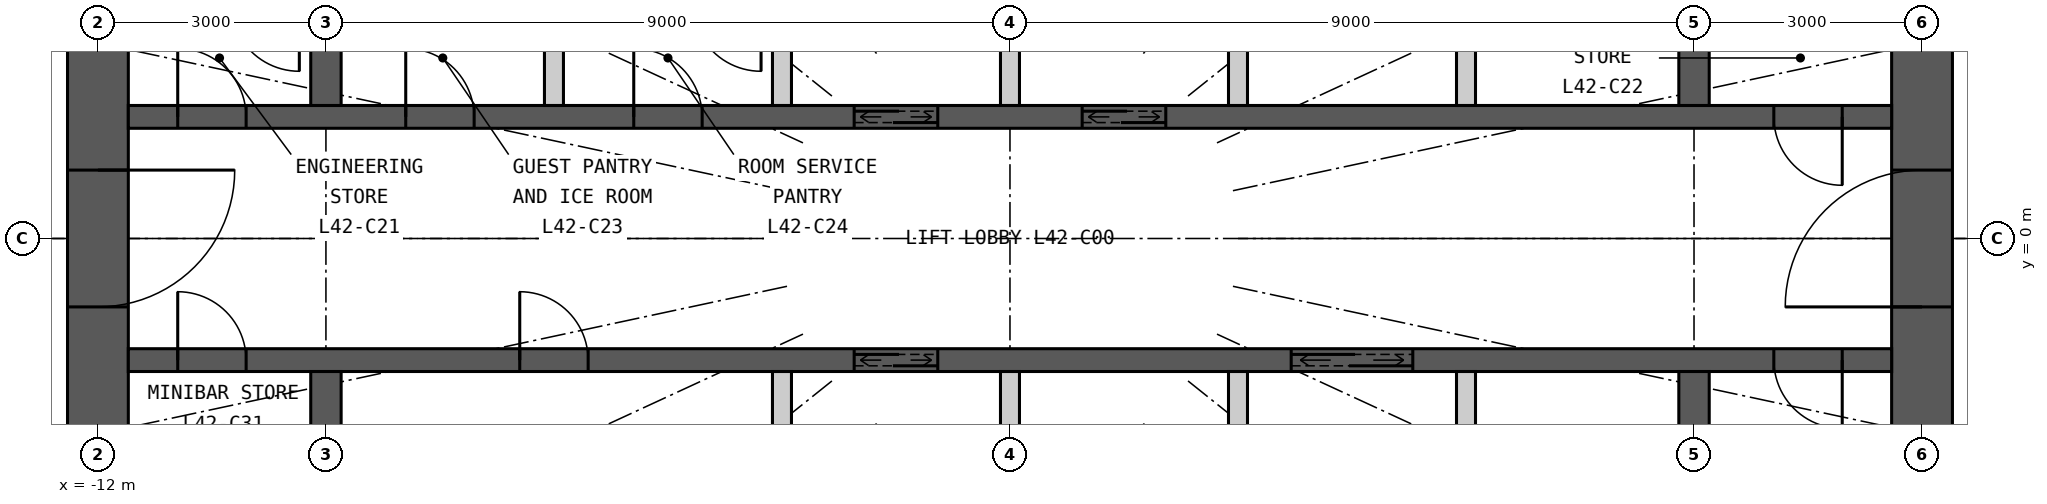
"""IFC4 building model, lengths in metres.
Left out: names, types, materials, properties, quantities, classifications, styles, units other than length and angle.
Written with IfcOpenShell. Run it as: python <this file> out.ifc"""

import sys

from ifc_helpers import new_model, si_unit, direction, frame, frame_2d, origin, place, context, subcontext, project, spatial, rectangle, extrude, element, fill, save


model = new_model("IFC4")
c1 = context("Model", 3, precision=1e-05, world=origin(), true_north=direction((0.0, 1.0)))
c2 = subcontext(c1, "Body", "Model", "MODEL_VIEW")
j1 = project(units=[si_unit("LENGTHUNIT", "METRE"), si_unit("PLANEANGLEUNIT", "RADIAN")], contexts=[c1])
p1 = place(None, origin())
s1 = spatial("IfcSite", under=j1, at=p1, CompositionType="ELEMENT")
p2 = place(p1, origin())
s2 = spatial("IfcBuilding", under=s1, at=p2, CompositionType="ELEMENT")
p3 = place(p2, frame((0.0, 0.0, 159.9)))
s3 = spatial("IfcBuildingStorey", under=s2, at=p3, CompositionType="ELEMENT", Elevation=159.9)
p4 = place(p3, frame((12.0, -7.6, 0.0), z_axis=(0.0, 0.0, 1.0), x_axis=(0.0, 1.0, 0.0)))
e1 = element("IfcWall", 1, at=p4, inside=s3, PredefinedType="SHEAR", context=c2, shape_type="SweptSolid", body=[
    extrude(rectangle(XDim=15.2, YDim=0.8, at=frame_2d((7.6, 0.0))), origin(), (0.0, 0.0, 1.0), 3.3),
])
p5 = place(p4, frame((6.7, 0.0, 0.0)))
e2 = element("IfcOpeningElement", 2, at=p5, cuts=e1, PredefinedType="OPENING", context=c2, shape_type="SweptSolid", body=[
    extrude(rectangle(XDim=1.8, YDim=2.2, at=frame_2d((0.9, 1.1))), frame((0.0, 0.41, 0.0), z_axis=(0.0, -1.0, 0.0), x_axis=(1.0, 0.0, 0.0)), (0.0, 0.0, 1.0), 0.82),
])
p6 = place(p3, frame((-12.0, 7.6, 0.0), z_axis=(0.0, 0.0, 1.0), x_axis=(0.0, -1.0, 0.0)))
e3 = element("IfcWall", 3, at=p6, inside=s3, PredefinedType="SHEAR", context=c2, shape_type="SweptSolid", body=[
    extrude(rectangle(XDim=15.2, YDim=0.8, at=frame_2d((7.6, 0.0))), origin(), (0.0, 0.0, 1.0), 3.3),
])
p7 = place(p6, frame((6.7, 0.0, 0.0)))
e4 = element("IfcOpeningElement", 4, at=p7, cuts=e3, PredefinedType="OPENING", context=c2, shape_type="SweptSolid", body=[
    extrude(rectangle(XDim=1.8, YDim=2.2, at=frame_2d((0.9, 1.1))), frame((0.0, 0.41, 0.0), z_axis=(0.0, -1.0, 0.0), x_axis=(1.0, 0.0, 0.0)), (0.0, 0.0, 1.0), 0.82),
])
p8 = place(p3, frame((-11.6, 1.6, 0.0), z_axis=(0.0, 0.0, 1.0), x_axis=(1.0, 0.0, 0.0)))
e5 = element("IfcWall", 5, at=p8, inside=s3, PredefinedType="SHEAR", context=c2, shape_type="SweptSolid", body=[
    extrude(rectangle(XDim=23.2, YDim=0.3, at=frame_2d((11.6, 0.0))), origin(), (0.0, 0.0, 1.0), 3.3),
])
p9 = place(p8, frame((9.55, 0.0, 0.0)))
e6 = element("IfcOpeningElement", 6, at=p9, cuts=e5, PredefinedType="OPENING", context=c2, shape_type="SweptSolid", body=[
    extrude(rectangle(XDim=1.1, YDim=2.2, at=frame_2d((0.55, 1.1))), frame((0.0, 0.16, 0.0), z_axis=(0.0, -1.0, 0.0), x_axis=(1.0, 0.0, 0.0)), (0.0, 0.0, 1.0), 0.32),
])
p10 = place(p8, frame((12.55, 0.0, 0.0)))
e7 = element("IfcOpeningElement", 7, at=p10, cuts=e5, PredefinedType="OPENING", context=c2, shape_type="SweptSolid", body=[
    extrude(rectangle(XDim=1.1, YDim=2.2, at=frame_2d((0.55, 1.1))), frame((0.0, 0.16, 0.0), z_axis=(0.0, -1.0, 0.0), x_axis=(1.0, 0.0, 0.0)), (0.0, 0.0, 1.0), 0.32),
])
p11 = place(p8, frame((0.65, 0.0, 0.0)))
e8 = element("IfcOpeningElement", 8, at=p11, cuts=e5, PredefinedType="OPENING", context=c2, shape_type="SweptSolid", body=[
    extrude(rectangle(XDim=0.9, YDim=2.2, at=frame_2d((0.45, 1.1))), frame((0.0, 0.16, 0.0), z_axis=(0.0, -1.0, 0.0), x_axis=(1.0, 0.0, 0.0)), (0.0, 0.0, 1.0), 0.32),
])
p12 = place(p8, frame((21.65, 0.0, 0.0)))
e9 = element("IfcOpeningElement", 9, at=p12, cuts=e5, PredefinedType="OPENING", context=c2, shape_type="SweptSolid", body=[
    extrude(rectangle(XDim=0.9, YDim=2.2, at=frame_2d((0.45, 1.1))), frame((0.0, 0.16, 0.0), z_axis=(0.0, -1.0, 0.0), x_axis=(1.0, 0.0, 0.0)), (0.0, 0.0, 1.0), 0.32),
])
p13 = place(p8, frame((3.65, 0.0, 0.0)))
e10 = element("IfcOpeningElement", 10, at=p13, cuts=e5, PredefinedType="OPENING", context=c2, shape_type="SweptSolid", body=[
    extrude(rectangle(XDim=0.9, YDim=2.2, at=frame_2d((0.45, 1.1))), frame((0.0, 0.16, 0.0), z_axis=(0.0, -1.0, 0.0), x_axis=(1.0, 0.0, 0.0)), (0.0, 0.0, 1.0), 0.32),
])
p14 = place(p8, frame((6.65, 0.0, 0.0)))
e11 = element("IfcOpeningElement", 11, at=p14, cuts=e5, PredefinedType="OPENING", context=c2, shape_type="SweptSolid", body=[
    extrude(rectangle(XDim=0.9, YDim=2.2, at=frame_2d((0.45, 1.1))), frame((0.0, 0.16, 0.0), z_axis=(0.0, -1.0, 0.0), x_axis=(1.0, 0.0, 0.0)), (0.0, 0.0, 1.0), 0.32),
])
p15 = place(p3, frame((-11.6, -1.6, 0.0), z_axis=(0.0, 0.0, 1.0), x_axis=(1.0, 0.0, 0.0)))
e12 = element("IfcWall", 12, at=p15, inside=s3, PredefinedType="SHEAR", context=c2, shape_type="SweptSolid", body=[
    extrude(rectangle(XDim=23.2, YDim=0.3, at=frame_2d((11.6, 0.0))), origin(), (0.0, 0.0, 1.0), 3.3),
])
p16 = place(p15, frame((9.55, 0.0, 0.0)))
e13 = element("IfcOpeningElement", 13, at=p16, cuts=e12, PredefinedType="OPENING", context=c2, shape_type="SweptSolid", body=[
    extrude(rectangle(XDim=1.1, YDim=2.2, at=frame_2d((0.55, 1.1))), frame((0.0, 0.16, 0.0), z_axis=(0.0, -1.0, 0.0), x_axis=(1.0, 0.0, 0.0)), (0.0, 0.0, 1.0), 0.32),
])
p17 = place(p15, frame((15.3, 0.0, 0.0)))
e14 = element("IfcOpeningElement", 14, at=p17, cuts=e12, PredefinedType="OPENING", context=c2, shape_type="SweptSolid", body=[
    extrude(rectangle(XDim=1.6, YDim=2.4, at=frame_2d((0.8, 1.2))), frame((0.0, 0.16, 0.0), z_axis=(0.0, -1.0, 0.0), x_axis=(1.0, 0.0, 0.0)), (0.0, 0.0, 1.0), 0.32),
])
p18 = place(p15, frame((0.65, 0.0, 0.0)))
e15 = element("IfcOpeningElement", 15, at=p18, cuts=e12, PredefinedType="OPENING", context=c2, shape_type="SweptSolid", body=[
    extrude(rectangle(XDim=0.9, YDim=2.2, at=frame_2d((0.45, 1.1))), frame((0.0, 0.16, 0.0), z_axis=(0.0, -1.0, 0.0), x_axis=(1.0, 0.0, 0.0)), (0.0, 0.0, 1.0), 0.32),
])
p19 = place(p15, frame((5.15, 0.0, 0.0)))
e16 = element("IfcOpeningElement", 16, at=p19, cuts=e12, PredefinedType="OPENING", context=c2, shape_type="SweptSolid", body=[
    extrude(rectangle(XDim=0.9, YDim=2.2, at=frame_2d((0.45, 1.1))), frame((0.0, 0.16, 0.0), z_axis=(0.0, -1.0, 0.0), x_axis=(1.0, 0.0, 0.0)), (0.0, 0.0, 1.0), 0.32),
])
p20 = place(p15, frame((21.65, 0.0, 0.0)))
e17 = element("IfcOpeningElement", 17, at=p20, cuts=e12, PredefinedType="OPENING", context=c2, shape_type="SweptSolid", body=[
    extrude(rectangle(XDim=0.9, YDim=2.2, at=frame_2d((0.45, 1.1))), frame((0.0, 0.16, 0.0), z_axis=(0.0, -1.0, 0.0), x_axis=(1.0, 0.0, 0.0)), (0.0, 0.0, 1.0), 0.32),
])
for number, where, z_axis, x_axis in (
    (18, (-9.0, 1.75, 0.0), (0.0, 0.0, 1.0), (0.0, 1.0, 0.0)),
    (19, (-9.0, -4.1, 0.0), (0.0, 0.0, 1.0), (0.0, 1.0, 0.0)),
    (20, (9.0, 1.75, 0.0), (0.0, 0.0, 1.0), (0.0, 1.0, 0.0)),
    (21, (9.0, -4.1, 0.0), (0.0, 0.0, 1.0), (0.0, 1.0, 0.0)),
):
    element("IfcWall", number, at=place(p3, frame(where, z_axis=z_axis, x_axis=x_axis)), inside=s3, PredefinedType="SHEAR", context=c2, shape_type="SweptSolid", body=[
        extrude(rectangle(XDim=2.35, YDim=0.4, at=frame_2d((1.175, 0.0))), origin(), (0.0, 0.0, 1.0), 3.3),
    ])
for number, where, z_axis, x_axis in (
    (22, (-6.0, 1.75, 0.0), (0.0, 0.0, 1.0), (0.0, 1.0, 0.0)),
    (23, (-3.0, 1.75, 0.0), (0.0, 0.0, 1.0), (0.0, 1.0, 0.0)),
    (24, (0.0, 1.75, 0.0), (0.0, 0.0, 1.0), (0.0, 1.0, 0.0)),
    (25, (3.0, 1.75, 0.0), (0.0, 0.0, 1.0), (0.0, 1.0, 0.0)),
    (26, (6.0, 1.75, 0.0), (0.0, 0.0, 1.0), (0.0, 1.0, 0.0)),
    (27, (-3.0, -4.1, 0.0), (0.0, 0.0, 1.0), (0.0, 1.0, 0.0)),
    (28, (0.0, -4.1, 0.0), (0.0, 0.0, 1.0), (0.0, 1.0, 0.0)),
    (29, (3.0, -4.1, 0.0), (0.0, 0.0, 1.0), (0.0, 1.0, 0.0)),
    (30, (6.0, -4.1, 0.0), (0.0, 0.0, 1.0), (0.0, 1.0, 0.0)),
):
    element("IfcWall", number, at=place(p3, frame(where, z_axis=z_axis, x_axis=x_axis)), inside=s3, PredefinedType="PARTITIONING", context=c2, shape_type="SweptSolid", body=[
        extrude(rectangle(XDim=2.35, YDim=0.25, at=frame_2d((1.175, 0.0))), origin(), (0.0, 0.0, 1.0), 3.3),
    ])
p21 = place(p9, origin())
e31 = element("IfcDoor", 31, at=p21, inside=s3, OperationType="DOUBLE_DOOR_SLIDING", PredefinedType="DOOR", context=c2, shape_type="SweptSolid", body=[
    extrude(rectangle(XDim=1.1, YDim=2.2, at=frame_2d((0.55, 1.1))), frame((0.0, 0.025, 0.0), z_axis=(0.0, -1.0, 0.0), x_axis=(1.0, 0.0, 0.0)), (0.0, 0.0, 1.0), 0.05),
])
fill(e6, e31)
p22 = place(p10, origin())
e32 = element("IfcDoor", 32, at=p22, inside=s3, OperationType="DOUBLE_DOOR_SLIDING", PredefinedType="DOOR", context=c2, shape_type="SweptSolid", body=[
    extrude(rectangle(XDim=1.1, YDim=2.2, at=frame_2d((0.55, 1.1))), frame((0.0, 0.025, 0.0), z_axis=(0.0, -1.0, 0.0), x_axis=(1.0, 0.0, 0.0)), (0.0, 0.0, 1.0), 0.05),
])
fill(e7, e32)
p23 = place(p16, origin())
e33 = element("IfcDoor", 33, at=p23, inside=s3, OperationType="DOUBLE_DOOR_SLIDING", PredefinedType="DOOR", context=c2, shape_type="SweptSolid", body=[
    extrude(rectangle(XDim=1.1, YDim=2.2, at=frame_2d((0.55, 1.1))), frame((0.0, 0.025, 0.0), z_axis=(0.0, -1.0, 0.0), x_axis=(1.0, 0.0, 0.0)), (0.0, 0.0, 1.0), 0.05),
])
fill(e13, e33)
p24 = place(p17, origin())
e34 = element("IfcDoor", 34, at=p24, inside=s3, OperationType="DOUBLE_DOOR_SLIDING", PredefinedType="DOOR", context=c2, shape_type="SweptSolid", body=[
    extrude(rectangle(XDim=1.6, YDim=2.4, at=frame_2d((0.8, 1.2))), frame((0.0, 0.025, 0.0), z_axis=(0.0, -1.0, 0.0), x_axis=(1.0, 0.0, 0.0)), (0.0, 0.0, 1.0), 0.05),
])
fill(e14, e34)
p25 = place(p11, origin())
e35 = element("IfcDoor", 35, at=p25, inside=s3, OperationType="SINGLE_SWING_LEFT", PredefinedType="DOOR", context=c2, shape_type="SweptSolid", body=[
    extrude(rectangle(XDim=0.9, YDim=2.2, at=frame_2d((0.45, 1.1))), frame((0.0, 0.025, 0.0), z_axis=(0.0, -1.0, 0.0), x_axis=(1.0, 0.0, 0.0)), (0.0, 0.0, 1.0), 0.05),
])
fill(e8, e35)
p26 = place(p12, origin())
e36 = element("IfcDoor", 36, at=p26, inside=s3, OperationType="SINGLE_SWING_RIGHT", PredefinedType="DOOR", context=c2, shape_type="SweptSolid", body=[
    extrude(rectangle(XDim=0.9, YDim=2.2, at=frame_2d((0.45, 1.1))), frame((0.0, 0.025, 0.0), z_axis=(0.0, -1.0, 0.0), x_axis=(1.0, 0.0, 0.0)), (0.0, 0.0, 1.0), 0.05),
])
fill(e9, e36)
p27 = place(p18, origin())
e37 = element("IfcDoor", 37, at=p27, inside=s3, OperationType="SINGLE_SWING_LEFT", PredefinedType="DOOR", context=c2, shape_type="SweptSolid", body=[
    extrude(rectangle(XDim=0.9, YDim=2.2, at=frame_2d((0.45, 1.1))), frame((0.0, 0.025, 0.0), z_axis=(0.0, -1.0, 0.0), x_axis=(1.0, 0.0, 0.0)), (0.0, 0.0, 1.0), 0.05),
])
fill(e15, e37)
p28 = place(p19, origin())
e38 = element("IfcDoor", 38, at=p28, inside=s3, OperationType="SINGLE_SWING_LEFT", PredefinedType="DOOR", context=c2, shape_type="SweptSolid", body=[
    extrude(rectangle(XDim=0.9, YDim=2.2, at=frame_2d((0.45, 1.1))), frame((0.0, 0.025, 0.0), z_axis=(0.0, -1.0, 0.0), x_axis=(1.0, 0.0, 0.0)), (0.0, 0.0, 1.0), 0.05),
])
fill(e16, e38)
p29 = place(p20, origin())
e39 = element("IfcDoor", 39, at=p29, inside=s3, OperationType="SINGLE_SWING_RIGHT", PredefinedType="DOOR", context=c2, shape_type="SweptSolid", body=[
    extrude(rectangle(XDim=0.9, YDim=2.2, at=frame_2d((0.45, 1.1))), frame((0.0, 0.025, 0.0), z_axis=(0.0, -1.0, 0.0), x_axis=(1.0, 0.0, 0.0)), (0.0, 0.0, 1.0), 0.05),
])
fill(e17, e39)
p30 = place(p13, origin())
e40 = element("IfcDoor", 40, at=p30, inside=s3, OperationType="SINGLE_SWING_LEFT", PredefinedType="DOOR", context=c2, shape_type="SweptSolid", body=[
    extrude(rectangle(XDim=0.9, YDim=2.2, at=frame_2d((0.45, 1.1))), frame((0.0, 0.025, 0.0), z_axis=(0.0, -1.0, 0.0), x_axis=(1.0, 0.0, 0.0)), (0.0, 0.0, 1.0), 0.05),
])
fill(e10, e40)
p31 = place(p14, origin())
e41 = element("IfcDoor", 41, at=p31, inside=s3, OperationType="SINGLE_SWING_LEFT", PredefinedType="DOOR", context=c2, shape_type="SweptSolid", body=[
    extrude(rectangle(XDim=0.9, YDim=2.2, at=frame_2d((0.45, 1.1))), frame((0.0, 0.025, 0.0), z_axis=(0.0, -1.0, 0.0), x_axis=(1.0, 0.0, 0.0)), (0.0, 0.0, 1.0), 0.05),
])
fill(e11, e41)
p32 = place(p5, origin())
e42 = element("IfcDoor", 42, at=p32, inside=s3, OperationType="DOUBLE_DOOR_DOUBLE_SWING", PredefinedType="DOOR", context=c2, shape_type="SweptSolid", body=[
    extrude(rectangle(XDim=1.8, YDim=2.2, at=frame_2d((0.9, 1.1))), frame((0.0, 0.025, 0.0), z_axis=(0.0, -1.0, 0.0), x_axis=(1.0, 0.0, 0.0)), (0.0, 0.0, 1.0), 0.05),
])
fill(e2, e42)
p33 = place(p7, origin())
e43 = element("IfcDoor", 43, at=p33, inside=s3, OperationType="DOUBLE_DOOR_DOUBLE_SWING", PredefinedType="DOOR", context=c2, shape_type="SweptSolid", body=[
    extrude(rectangle(XDim=1.8, YDim=2.2, at=frame_2d((0.9, 1.1))), frame((0.0, 0.025, 0.0), z_axis=(0.0, -1.0, 0.0), x_axis=(1.0, 0.0, 0.0)), (0.0, 0.0, 1.0), 0.05),
])
fill(e4, e43)
save(model, sys.argv[1])
